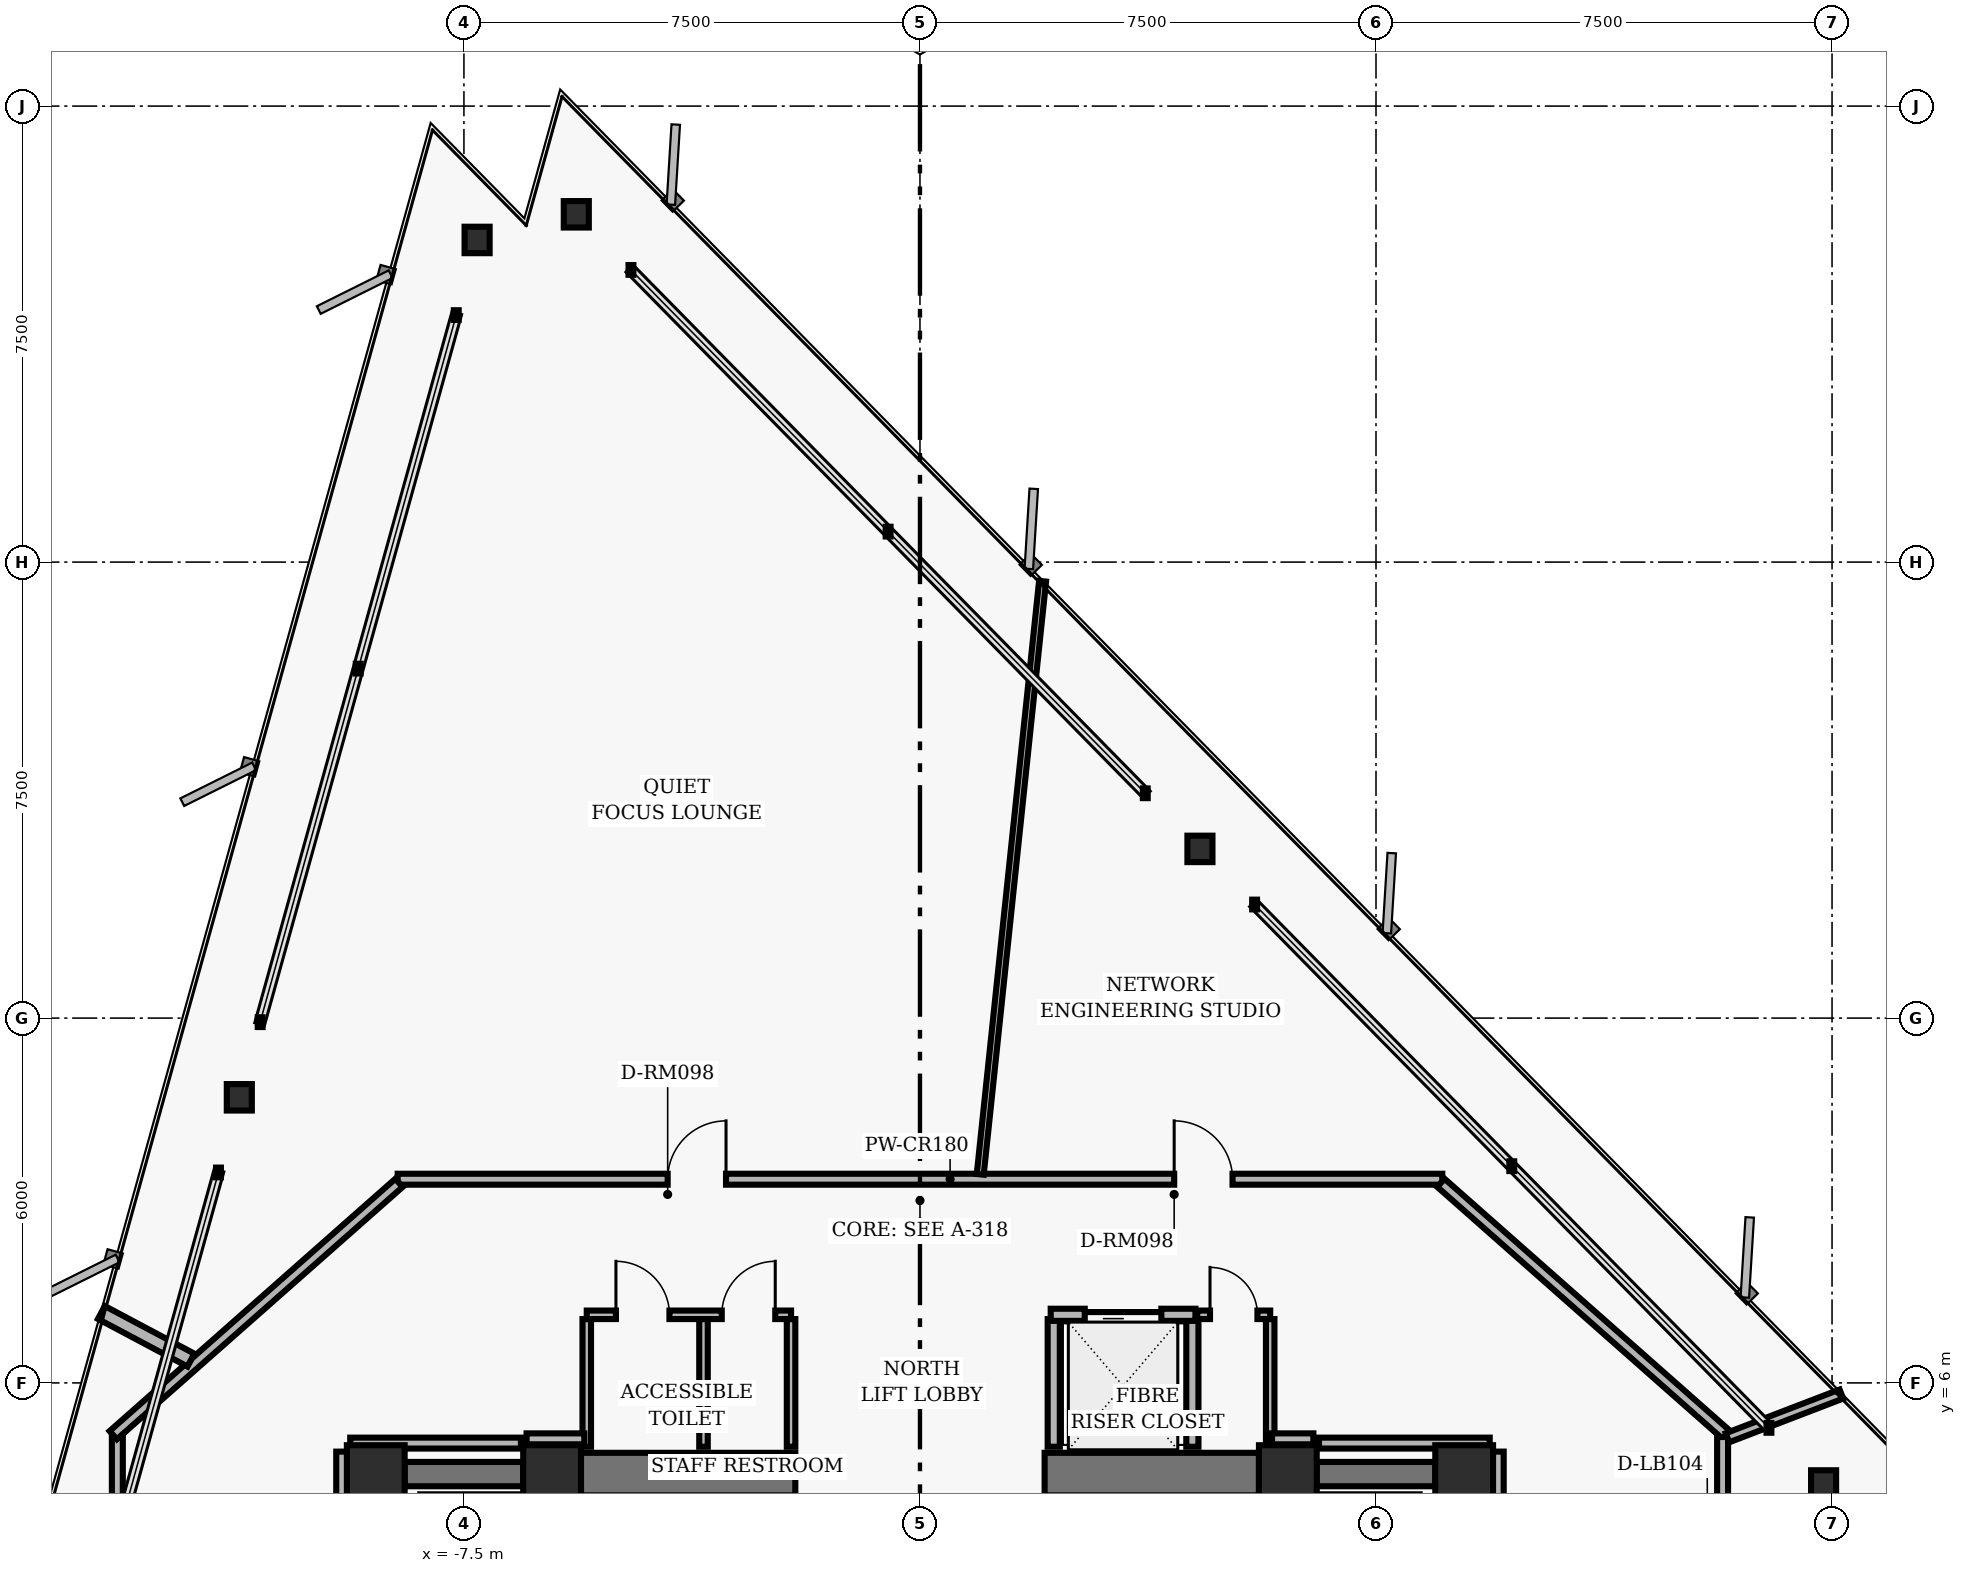
"""IFC4 building model, lengths in metres.
Left out: names, types, materials, properties, quantities, classifications, styles, units other than length and angle.
Written with IfcOpenShell. Run it as: python <this file> out.ifc"""

import sys

from ifc_helpers import new_model, si_unit, direction, frame, frame_2d, origin, origin_2d, place, context, subcontext, project, spatial, rectangle, hollow_rectangle, i_section, extrude, element, fill, save


model = new_model("IFC4")
c1 = context("Model", 3, precision=1e-05, world=origin(), true_north=direction((0.0, 1.0)))
c2 = subcontext(c1, "Body", "Model", "MODEL_VIEW")
j1 = project(units=[si_unit("LENGTHUNIT", "METRE"), si_unit("PLANEANGLEUNIT", "RADIAN")], contexts=[c1])
p1 = place(None, origin())
s1 = spatial("IfcSite", under=j1, at=p1, CompositionType="ELEMENT")
p2 = place(p1, origin())
s2 = spatial("IfcBuilding", under=s1, at=p2, CompositionType="ELEMENT")
p3 = place(p2, frame((0.0, 0.0, 97.76)))
s3 = spatial("IfcBuildingStorey", under=s2, at=p3, CompositionType="ELEMENT", Elevation=97.76)
for number, where, z_axis, x_axis in (
    (1, (-6.05, 4.5, 0.0), (0.0, 0.0, 1.0), (1.0, 0.0, 0.0)),
    (2, (6.05, 4.5, 0.0), (0.0, 0.0, 1.0), (1.0, 0.0, 0.0)),
    (3, (-8.95, 4.5, 0.0), (0.0, 0.0, 1.0), (1.0, 0.0, 0.0)),
    (4, (8.95, 4.5, 0.0), (0.0, 0.0, 1.0), (1.0, 0.0, 0.0)),
):
    element("IfcColumn", number, at=place(p3, frame(where, z_axis=z_axis, x_axis=x_axis)), inside=s3, PredefinedType="COLUMN", context=c2, shape_type="SweptSolid", body=[
        extrude(hollow_rectangle(XDim=0.95, YDim=0.95, WallThickness=0.06, InnerFilletRadius=0.02, OuterFilletRadius=0.04, at=origin_2d()), origin(), (0.0, 0.0, 1.0), 3.04),
    ])
for number, where, z_axis, x_axis in (
    (5, (-5.575, 4.5, 0.0), (0.0, 0.0, 1.0), (1.0, 0.0, 0.0)),
    (6, (2.05, 4.5, 0.0), (0.0, 0.0, 1.0), (1.0, 0.0, 0.0)),
):
    element("IfcWall", number, at=place(p3, frame(where, z_axis=z_axis, x_axis=x_axis)), inside=s3, PredefinedType="SHEAR", context=c2, shape_type="SweptSolid", body=[
        extrude(rectangle(XDim=3.525, YDim=0.7, at=frame_2d((1.762, 0.0))), origin(), (0.0, 0.0, 1.0), 2.718),
    ])
for number, where, z_axis, x_axis in (
    (7, (-8.475, 4.5, 0.0), (0.0, 0.0, 1.0), (1.0, 0.0, 0.0)),
    (8, (6.525, 4.5, 0.0), (0.0, 0.0, 1.0), (1.0, 0.0, 0.0)),
):
    element("IfcWall", number, at=place(p3, frame(where, z_axis=z_axis, x_axis=x_axis)), inside=s3, PredefinedType="SHEAR", context=c2, shape_type="SweptSolid", body=[
        extrude(rectangle(XDim=1.95, YDim=0.4, at=frame_2d((0.975, 0.0))), origin(), (0.0, 0.0, 1.0), 2.718),
    ])
for number, where, z_axis, x_axis in (
    (9, (14.861, 4.346, 0.0), (0.0, 0.0, 1.0), (1.0, 0.0, 0.0)),
    (10, (4.604, 14.783, 0.0), (0.0, 0.0, 1.0), (1.0, 0.0, 0.0)),
    (11, (-5.652, 25.22, 0.0), (0.0, 0.0, 1.0), (1.0, 0.0, 0.0)),
    (12, (-7.283, 24.798, 0.0), (0.0, 0.0, 1.0), (1.0, 0.0, 0.0)),
    (13, (-11.194, 10.697, 0.0), (0.0, 0.0, 1.0), (1.0, 0.0, 0.0)),
):
    element("IfcColumn", number, at=place(p3, frame(where, z_axis=z_axis, x_axis=x_axis)), inside=s3, PredefinedType="COLUMN", context=c2, shape_type="SweptSolid", body=[
        extrude(i_section(OverallWidth=0.412, OverallDepth=0.435, WebThickness=0.036, FlangeThickness=0.057, FilletRadius=0.022, at=origin_2d()), origin(), (0.0, 0.0, 1.0), 3.04),
    ])
for number, where, z_axis, x_axis in (
    (14, (2.2, 4.95, 0.0), (0.0, 0.0, 1.0), (0.0, 1.0, 0.0)),
    (15, (4.48, 4.95, 0.0), (0.0, 0.0, 1.0), (0.0, 1.0, 0.0)),
):
    element("IfcWall", number, at=place(p3, frame(where, z_axis=z_axis, x_axis=x_axis)), inside=s3, PredefinedType="PARTITIONING", context=c2, shape_type="SweptSolid", body=[
        extrude(rectangle(XDim=2.1, YDim=0.2, at=frame_2d((1.05, 0.0))), origin(), (0.0, 0.0, 1.0), 2.693),
    ])
p4 = place(p3, frame((2.15, 7.12, 0.0), z_axis=(0.0, 0.0, 1.0), x_axis=(1.0, 0.0, 0.0)))
e16 = element("IfcWall", 16, at=p4, inside=s3, PredefinedType="PARTITIONING", context=c2, shape_type="SweptSolid", body=[
    extrude(rectangle(XDim=2.38, YDim=0.2, at=frame_2d((1.19, 0.0))), origin(), (0.0, 0.0, 1.0), 2.693),
])
p5 = place(p4, frame((0.56, 0.0, 0.0)))
e17 = element("IfcOpeningElement", 17, at=p5, cuts=e16, PredefinedType="OPENING", context=c2, shape_type="SweptSolid", body=[
    extrude(rectangle(XDim=1.26, YDim=2.06, at=frame_2d((0.63, 1.03))), frame((0.0, 0.11, 0.0), z_axis=(0.0, -1.0, 0.0), x_axis=(1.0, 0.0, 0.0)), (0.0, 0.0, 1.0), 0.22),
])
for number, where, z_axis, x_axis in (
    (18, (-5.48, 4.95, 0.0), (0.0, 0.0, 1.0), (0.0, 1.0, 0.0)),
    (19, (-3.56, 4.95, 0.0), (0.0, 0.0, 1.0), (0.0, 1.0, 0.0)),
    (20, (-2.12, 4.95, 0.0), (0.0, 0.0, 1.0), (0.0, 1.0, 0.0)),
):
    element("IfcWall", number, at=place(p3, frame(where, z_axis=z_axis, x_axis=x_axis)), inside=s3, PredefinedType="PARTITIONING", context=c2, shape_type="SweptSolid", body=[
        extrude(rectangle(XDim=2.1, YDim=0.14, at=frame_2d((1.05, 0.0))), origin(), (0.0, 0.0, 1.0), 2.693),
    ])
p6 = place(p3, frame((-5.48, 7.12, 0.0), z_axis=(0.0, 0.0, 1.0), x_axis=(1.0, 0.0, 0.0)))
e21 = element("IfcWall", 21, at=p6, inside=s3, PredefinedType="PARTITIONING", context=c2, shape_type="SweptSolid", body=[
    extrude(rectangle(XDim=3.36, YDim=0.14, at=frame_2d((1.68, 0.0))), origin(), (0.0, 0.0, 1.0), 2.693),
])
p7 = place(p6, frame((0.48, 0.0, 0.0)))
e22 = element("IfcOpeningElement", 22, at=p7, cuts=e21, PredefinedType="OPENING", context=c2, shape_type="SweptSolid", body=[
    extrude(rectangle(XDim=0.88, YDim=2.02, at=frame_2d((0.44, 1.01))), frame((0.0, 0.08, 0.0), z_axis=(0.0, -1.0, 0.0), x_axis=(1.0, 0.0, 0.0)), (0.0, 0.0, 1.0), 0.16),
])
p8 = place(p6, frame((2.22, 0.0, 0.0)))
e23 = element("IfcOpeningElement", 23, at=p8, cuts=e21, PredefinedType="OPENING", context=c2, shape_type="SweptSolid", body=[
    extrude(rectangle(XDim=0.88, YDim=2.02, at=frame_2d((0.44, 1.01))), frame((0.0, 0.08, 0.0), z_axis=(0.0, -1.0, 0.0), x_axis=(1.0, 0.0, 0.0)), (0.0, 0.0, 1.0), 0.16),
])
p9 = place(p3, frame((5.76, 4.95, 0.0), z_axis=(0.0, 0.0, 1.0), x_axis=(0.0, 1.0, 0.0)))
e24 = element("IfcWall", 24, at=p9, inside=s3, PredefinedType="PARTITIONING", context=c2, shape_type="SweptSolid", body=[
    extrude(rectangle(XDim=2.1, YDim=0.14, at=frame_2d((1.05, 0.0))), origin(), (0.0, 0.0, 1.0), 2.693),
])
p10 = place(p3, frame((4.56, 7.12, 0.0), z_axis=(0.0, 0.0, 1.0), x_axis=(1.0, 0.0, 0.0)))
e25 = element("IfcWall", 25, at=p10, inside=s3, PredefinedType="PARTITIONING", context=c2, shape_type="SweptSolid", body=[
    extrude(rectangle(XDim=1.2, YDim=0.14, at=frame_2d((0.6, 0.0))), origin(), (0.0, 0.0, 1.0), 2.693),
])
p11 = place(p10, frame((0.21, 0.0, 0.0)))
e26 = element("IfcOpeningElement", 26, at=p11, cuts=e25, PredefinedType="OPENING", context=c2, shape_type="SweptSolid", body=[
    extrude(rectangle(XDim=0.78, YDim=2.01, at=frame_2d((0.39, 1.005))), frame((0.0, 0.08, 0.0), z_axis=(0.0, -1.0, 0.0), x_axis=(1.0, 0.0, 0.0)), (0.0, 0.0, 1.0), 0.16),
])
p12 = place(p3, frame((-8.59, 9.35, 0.0), z_axis=(0.0, 0.0, 1.0), x_axis=(1.0, 0.0, 0.0)))
e27 = element("IfcWall", 27, at=p12, inside=s3, PredefinedType="PARTITIONING", context=c2, shape_type="SweptSolid", body=[
    extrude(rectangle(XDim=17.18, YDim=0.18, at=frame_2d((8.59, 0.0))), origin(), (0.0, 0.0, 1.0), 2.207),
])
p13 = place(p12, frame((12.771, 0.0, 0.0)))
e28 = element("IfcOpeningElement", 28, at=p13, cuts=e27, PredefinedType="OPENING", context=c2, shape_type="SweptSolid", body=[
    extrude(rectangle(XDim=0.96, YDim=2.02, at=frame_2d((0.48, 1.01))), frame((0.0, 0.1, 0.0), z_axis=(0.0, -1.0, 0.0), x_axis=(1.0, 0.0, 0.0)), (0.0, 0.0, 1.0), 0.2),
])
p14 = place(p12, frame((4.44, 0.0, 0.0)))
e29 = element("IfcOpeningElement", 29, at=p14, cuts=e27, PredefinedType="OPENING", context=c2, shape_type="SweptSolid", body=[
    extrude(rectangle(XDim=0.96, YDim=2.02, at=frame_2d((0.48, 1.01))), frame((0.0, 0.1, 0.0), z_axis=(0.0, -1.0, 0.0), x_axis=(1.0, 0.0, 0.0)), (0.0, 0.0, 1.0), 0.2),
])
p15 = place(p3, frame((8.567, 9.29, 0.0), z_axis=(0.0, 0.0, 1.0), x_axis=(0.749626463267, -0.66186113768, 0.0)))
e30 = element("IfcWall", 30, at=p15, inside=s3, PredefinedType="PARTITIONING", context=c2, shape_type="SweptSolid", body=[
    extrude(rectangle(XDim=6.27, YDim=0.18, at=frame_2d((3.135, 0.0))), origin(), (0.0, 0.0, 1.0), 2.207),
])
p16 = place(p3, frame((13.2, 5.11, 0.0), z_axis=(0.0, 0.0, 1.0), x_axis=(0.0, -1.0, 0.0)))
e31 = element("IfcWall", 31, at=p16, inside=s3, PredefinedType="PARTITIONING", context=c2, shape_type="SweptSolid", body=[
    extrude(rectangle(XDim=10.22, YDim=0.18, at=frame_2d((5.11, 0.0))), origin(), (0.0, 0.0, 1.0), 2.207),
])
p17 = place(p16, frame((6.122, 0.0, 0.0)))
e32 = element("IfcOpeningElement", 32, at=p17, cuts=e31, PredefinedType="OPENING", context=c2, shape_type="SweptSolid", body=[
    extrude(rectangle(XDim=0.96, YDim=2.02, at=frame_2d((0.48, 1.01))), frame((0.0, 0.1, 0.0), z_axis=(0.0, -1.0, 0.0), x_axis=(1.0, 0.0, 0.0)), (0.0, 0.0, 1.0), 0.2),
])
p18 = place(p16, frame((1.242, 0.0, 0.0)))
e33 = element("IfcOpeningElement", 33, at=p18, cuts=e31, PredefinedType="OPENING", context=c2, shape_type="SweptSolid", body=[
    extrude(rectangle(XDim=1.02, YDim=2.02, at=frame_2d((0.51, 1.01))), frame((0.0, 0.1, 0.0), z_axis=(0.0, -1.0, 0.0), x_axis=(1.0, 0.0, 0.0)), (0.0, 0.0, 1.0), 0.2),
])
p19 = place(p3, frame((-13.2, -5.11, 0.0), z_axis=(0.0, 0.0, 1.0), x_axis=(0.0, 1.0, 0.0)))
e34 = element("IfcWall", 34, at=p19, inside=s3, PredefinedType="PARTITIONING", context=c2, shape_type="SweptSolid", body=[
    extrude(rectangle(XDim=10.22, YDim=0.18, at=frame_2d((5.11, 0.0))), origin(), (0.0, 0.0, 1.0), 2.073),
])
p20 = place(p3, frame((-13.268, 5.14, 0.0), z_axis=(0.0, 0.0, 1.0), x_axis=(0.749626463267, 0.66186113768, 0.0)))
e35 = element("IfcWall", 35, at=p20, inside=s3, PredefinedType="PARTITIONING", context=c2, shape_type="SweptSolid", body=[
    extrude(rectangle(XDim=6.27, YDim=0.18, at=frame_2d((3.135, 0.0))), origin(), (0.0, 0.0, 1.0), 2.693),
])
p21 = place(p3, frame((-9.51, 4.87, 0.0), z_axis=(0.0, 0.0, 1.0), x_axis=(0.0, -1.0, 0.0)))
e36 = element("IfcWall", 36, at=p21, inside=s3, PredefinedType="PARTITIONING", context=c2, shape_type="SweptSolid", body=[
    extrude(rectangle(XDim=0.82, YDim=0.18, at=frame_2d((0.41, 0.0))), origin(), (0.0, 0.0, 1.0), 2.207),
])
p22 = place(p3, frame((9.51, 3.95, 0.0), z_axis=(0.0, 0.0, 1.0), x_axis=(0.0, 1.0, 0.0)))
e37 = element("IfcWall", 37, at=p22, inside=s3, PredefinedType="PARTITIONING", context=c2, shape_type="SweptSolid", body=[
    extrude(rectangle(XDim=0.92, YDim=0.18, at=frame_2d((0.46, 0.0))), origin(), (0.0, 0.0, 1.0), 2.693),
])
p23 = place(p3, frame((9.37, 5.01, 0.0), z_axis=(0.0, 0.0, 1.0), x_axis=(-1.0, 0.0, 0.0)))
e38 = element("IfcWall", 38, at=p23, inside=s3, PredefinedType="PARTITIONING", context=c2, shape_type="SweptSolid", body=[
    extrude(rectangle(XDim=2.808, YDim=0.18, at=frame_2d((1.404, 0.0))), origin(), (0.0, 0.0, 1.0), 2.693),
])
p24 = place(p3, frame((6.47, 5.08, 0.0), z_axis=(0.0, 0.0, 1.0), x_axis=(-1.0, 0.0, 0.0)))
e39 = element("IfcWall", 39, at=p24, inside=s3, PredefinedType="PARTITIONING", context=c2, shape_type="SweptSolid", body=[
    extrude(rectangle(XDim=0.68, YDim=0.18, at=frame_2d((0.34, 0.0))), origin(), (0.0, 0.0, 1.0), 2.693),
])
p25 = place(p3, frame((-5.52, 5.08, 0.0), z_axis=(0.0, 0.0, 1.0), x_axis=(-1.0, 0.0, 0.0)))
e40 = element("IfcWall", 40, at=p25, inside=s3, PredefinedType="PARTITIONING", context=c2, shape_type="SweptSolid", body=[
    extrude(rectangle(XDim=0.95, YDim=0.18, at=frame_2d((0.475, 0.0))), origin(), (0.0, 0.0, 1.0), 2.693),
])
p26 = place(p3, frame((-6.562, 5.01, 0.0), z_axis=(0.0, 0.0, 1.0), x_axis=(-1.0, 0.0, 0.0)))
e41 = element("IfcWall", 41, at=p26, inside=s3, PredefinedType="PARTITIONING", context=c2, shape_type="SweptSolid", body=[
    extrude(rectangle(XDim=2.808, YDim=0.18, at=frame_2d((1.404, 0.0))), origin(), (0.0, 0.0, 1.0), 2.693),
])
p27 = place(p3, frame((13.28, 5.098, 0.0), z_axis=(0.0, 0.0, 1.0), x_axis=(0.933586794089, 0.358351360962, 0.0)))
e42 = element("IfcWall", 42, at=p27, inside=s3, PredefinedType="PARTITIONING", context=c2, shape_type="SweptSolid", body=[
    extrude(rectangle(XDim=2.007, YDim=0.16, at=frame_2d((1.003, 0.0))), origin(), (0.0, 0.0, 1.0), 2.693),
])
p28 = place(p3, frame((0.991, 9.43, 0.0), z_axis=(0.0, 0.0, 1.0), x_axis=(0.10452931889, 0.994521805438, 0.0)))
e43 = element("IfcWall", 43, at=p28, inside=s3, PredefinedType="MOVABLE", context=c2, shape_type="SweptSolid", body=[
    extrude(rectangle(XDim=9.81, YDim=0.115, at=frame_2d((4.905, 0.0))), origin(), (0.0, 0.0, 1.0), 2.693),
])
p29 = place(p3, frame((-11.99, 6.375, 0.0), z_axis=(0.0, 0.0, 1.0), x_axis=(-0.882931788889, 0.469501284524, 0.0)))
e44 = element("IfcWall", 44, at=p29, inside=s3, PredefinedType="PARTITIONING", context=c2, shape_type="SweptSolid", body=[
    extrude(rectangle(XDim=1.668, YDim=0.24, at=frame_2d((0.834, 0.0))), origin(), (0.0, 0.0, 1.0), 2.693),
])
p30 = place(p5, origin())
e45 = element("IfcDoor", 45, at=p30, inside=s3, OperationType="SLIDING_TO_LEFT", PredefinedType="DOOR", context=c2, shape_type="SweptSolid", body=[
    extrude(rectangle(XDim=1.26, YDim=2.06, at=frame_2d((0.63, 1.03))), frame((0.0, 0.025, 0.0), z_axis=(0.0, -1.0, 0.0), x_axis=(1.0, 0.0, 0.0)), (0.0, 0.0, 1.0), 0.05),
])
fill(e17, e45)
p31 = place(p7, origin())
e46 = element("IfcDoor", 46, at=p31, inside=s3, OperationType="SINGLE_SWING_LEFT", PredefinedType="DOOR", context=c2, shape_type="SweptSolid", body=[
    extrude(rectangle(XDim=0.88, YDim=2.02, at=frame_2d((0.44, 1.01))), frame((0.0, 0.025, 0.0), z_axis=(0.0, -1.0, 0.0), x_axis=(1.0, 0.0, 0.0)), (0.0, 0.0, 1.0), 0.05),
])
fill(e22, e46)
p32 = place(p8, origin())
e47 = element("IfcDoor", 47, at=p32, inside=s3, OperationType="SINGLE_SWING_RIGHT", PredefinedType="DOOR", context=c2, shape_type="SweptSolid", body=[
    extrude(rectangle(XDim=0.88, YDim=2.02, at=frame_2d((0.44, 1.01))), frame((0.0, 0.025, 0.0), z_axis=(0.0, -1.0, 0.0), x_axis=(1.0, 0.0, 0.0)), (0.0, 0.0, 1.0), 0.05),
])
fill(e23, e47)
p33 = place(p11, origin())
e48 = element("IfcDoor", 48, at=p33, inside=s3, OperationType="SINGLE_SWING_LEFT", PredefinedType="DOOR", context=c2, shape_type="SweptSolid", body=[
    extrude(rectangle(XDim=0.78, YDim=2.01, at=frame_2d((0.39, 1.005))), frame((0.0, 0.025, 0.0), z_axis=(0.0, -1.0, 0.0), x_axis=(1.0, 0.0, 0.0)), (0.0, 0.0, 1.0), 0.05),
])
fill(e26, e48)
p34 = place(p13, origin())
e49 = element("IfcDoor", 49, at=p34, inside=s3, OperationType="SINGLE_SWING_LEFT", PredefinedType="DOOR", context=c2, shape_type="SweptSolid", body=[
    extrude(rectangle(XDim=0.96, YDim=2.02, at=frame_2d((0.48, 1.01))), frame((0.0, 0.025, 0.0), z_axis=(0.0, -1.0, 0.0), x_axis=(1.0, 0.0, 0.0)), (0.0, 0.0, 1.0), 0.05),
])
fill(e28, e49)
p35 = place(p14, origin())
e50 = element("IfcDoor", 50, at=p35, inside=s3, OperationType="SINGLE_SWING_RIGHT", PredefinedType="DOOR", context=c2, shape_type="SweptSolid", body=[
    extrude(rectangle(XDim=0.96, YDim=2.02, at=frame_2d((0.48, 1.01))), frame((0.0, 0.025, 0.0), z_axis=(0.0, -1.0, 0.0), x_axis=(1.0, 0.0, 0.0)), (0.0, 0.0, 1.0), 0.05),
])
fill(e29, e50)
save(model, sys.argv[1])
